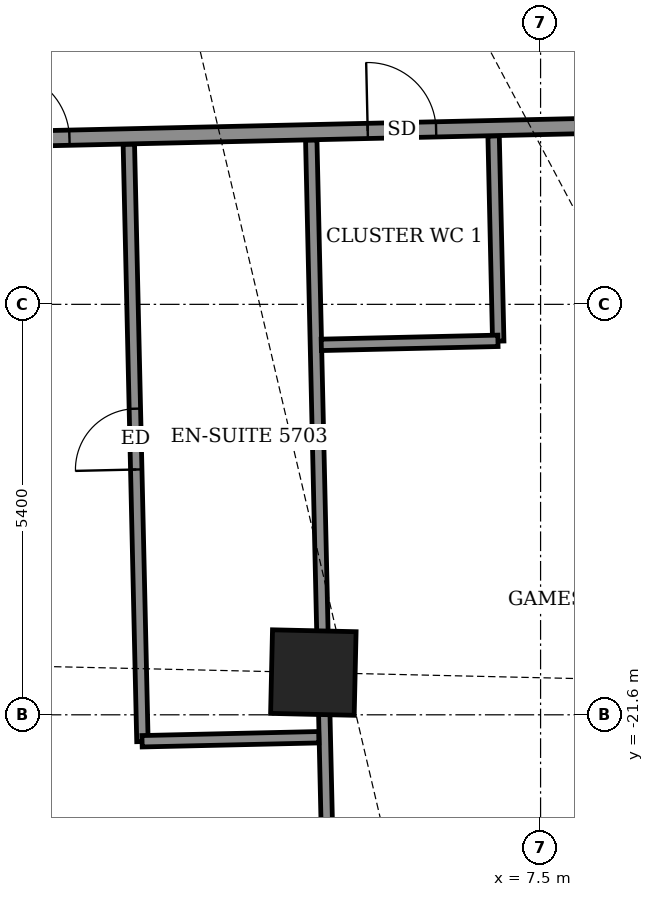
"""IFC4 building model, lengths in metres.
Left out: names, types, materials, properties, quantities, classifications, styles, units other than length and angle.
Written with IfcOpenShell. Run it as: python <this file> out.ifc"""

import sys

from ifc_helpers import new_model, si_unit, direction, frame, frame_2d, origin, origin_2d, place, context, subcontext, project, spatial, rectangle, extrude, element, fill, save


model = new_model("IFC4")
c1 = context("Model", 3, precision=1e-05, world=origin(), true_north=direction((0.0, 1.0)))
c2 = subcontext(c1, "Body", "Model", "MODEL_VIEW")
j1 = project(units=[si_unit("LENGTHUNIT", "METRE"), si_unit("PLANEANGLEUNIT", "RADIAN")], contexts=[c1])
p1 = place(None, origin())
s1 = spatial("IfcSite", under=j1, at=p1, CompositionType="ELEMENT")
p2 = place(p1, origin())
s2 = spatial("IfcBuilding", under=s1, at=p2, CompositionType="ELEMENT")
p3 = place(p2, frame((0.0, 0.0, 226.5)))
s3 = spatial("IfcBuildingStorey", under=s2, at=p3, CompositionType="ELEMENT", Elevation=226.5)
p4 = place(p3, frame((4.51, -21.044, -0.55), z_axis=(0.0, 0.0, 1.0), x_axis=(0.999742129581, -0.022708464065, 0.0)))
e1 = element("IfcColumn", 1, at=p4, inside=s3, PredefinedType="COLUMN", context=c2, shape_type="SweptSolid", body=[
    extrude(rectangle(XDim=1.1, YDim=1.1, at=origin_2d()), origin(), (0.0, 0.0, 1.0), 4.6),
])
p5 = place(p3, frame((4.741, -25.412, 0.0), z_axis=(0.0, 0.0, 1.0), x_axis=(-0.022684355347, 0.999742676904, 0.0)))
e2 = element("IfcWall", 2, at=p5, inside=s3, PredefinedType="PARTITIONING", context=c2, shape_type="SweptSolid", body=[
    extrude(rectangle(XDim=11.376, YDim=0.15, at=frame_2d((5.688, 0.0))), origin(), (0.0, 0.0, 1.0), 2.85),
])
p6 = place(p3, frame((2.262, -21.952, 0.0), z_axis=(0.0, 0.0, 1.0), x_axis=(-0.022767973308, 0.999740776097, 0.0)))
e3 = element("IfcWall", 3, at=p6, inside=s3, PredefinedType="PARTITIONING", context=c2, shape_type="SweptSolid", body=[
    extrude(rectangle(XDim=7.86, YDim=0.15, at=frame_2d((3.93, 0.0))), origin(), (0.0, 0.0, 1.0), 2.55),
])
p7 = place(p6, frame((3.58, 0.0, 0.0)))
e4 = element("IfcOpeningElement", 4, at=p7, cuts=e3, PredefinedType="OPENING", context=c2, shape_type="SweptSolid", body=[
    extrude(rectangle(XDim=0.8, YDim=2.1, at=frame_2d((0.4, 1.05))), frame((0.0, 0.085, 0.0), z_axis=(0.0, -1.0, 0.0), x_axis=(1.0, 0.0, 0.0)), (0.0, 0.0, 1.0), 0.17),
])
p8 = place(p3, frame((2.257, -21.948, 0.0), z_axis=(0.0, 0.0, 1.0), x_axis=(0.999740478815, 0.022781023197, 0.0)))
e5 = element("IfcWall", 5, at=p8, inside=s3, PredefinedType="PARTITIONING", context=c2, shape_type="SweptSolid", body=[
    extrude(rectangle(XDim=2.325, YDim=0.15, at=frame_2d((1.163, 0.0))), origin(), (0.0, 0.0, 1.0), 2.85),
])
p9 = place(p3, frame((6.943, -16.684, 0.0), z_axis=(0.0, 0.0, 1.0), x_axis=(-0.02260842146, 0.999744396973, 0.0)))
e6 = element("IfcWall", 6, at=p9, inside=s3, PredefinedType="PARTITIONING", context=c2, shape_type="SweptSolid", body=[
    extrude(rectangle(XDim=2.7, YDim=0.15, at=frame_2d((1.35, 0.0))), origin(), (0.0, 0.0, 1.0), 2.85),
])
p10 = place(p3, frame((4.615, -16.733, 0.0), z_axis=(0.0, 0.0, 1.0), x_axis=(0.999740260747, 0.02279059109, 0.0)))
e7 = element("IfcWall", 7, at=p10, inside=s3, PredefinedType="PARTITIONING", context=c2, shape_type="SweptSolid", body=[
    extrude(rectangle(XDim=2.324, YDim=0.15, at=frame_2d((1.162, 0.0))), origin(), (0.0, 0.0, 1.0), 2.85),
])
p11 = place(p3, frame((-27.016, -14.65, 0.0), z_axis=(0.0, 0.0, 1.0), x_axis=(0.999742722722, 0.022682335961, 0.0)))
e8 = element("IfcWall", 8, at=p11, inside=s3, PredefinedType="PARTITIONING", context=c2, shape_type="SweptSolid", body=[
    extrude(rectangle(XDim=49.114, YDim=0.2, at=frame_2d((24.557, 0.0))), origin(), (0.0, 0.0, 1.0), 2.55),
])
p12 = place(p11, frame((2.0, 0.0, 0.0)))
e9 = element("IfcOpeningElement", 9, at=p12, cuts=e8, PredefinedType="OPENING", context=c2, shape_type="SweptSolid", body=[
    extrude(rectangle(XDim=1.0, YDim=2.1, at=frame_2d((0.5, 1.05))), frame((0.0, 0.11, 0.0), z_axis=(0.0, -1.0, 0.0), x_axis=(1.0, 0.0, 0.0)), (0.0, 0.0, 1.0), 0.22),
])
p13 = place(p11, frame((7.35, 0.0, 0.0)))
e10 = element("IfcOpeningElement", 10, at=p13, cuts=e8, PredefinedType="OPENING", context=c2, shape_type="SweptSolid", body=[
    extrude(rectangle(XDim=0.9, YDim=2.1, at=frame_2d((0.45, 1.05))), frame((0.0, 0.11, 0.0), z_axis=(0.0, -1.0, 0.0), x_axis=(1.0, 0.0, 0.0)), (0.0, 0.0, 1.0), 0.22),
])
p14 = place(p11, frame((13.725, 0.0, 0.0)))
e11 = element("IfcOpeningElement", 11, at=p14, cuts=e8, PredefinedType="OPENING", context=c2, shape_type="SweptSolid", body=[
    extrude(rectangle(XDim=1.0, YDim=2.1, at=frame_2d((0.5, 1.05))), frame((0.0, 0.11, 0.0), z_axis=(0.0, -1.0, 0.0), x_axis=(1.0, 0.0, 0.0)), (0.0, 0.0, 1.0), 0.22),
])
p15 = place(p11, frame((9.85, 0.0, 0.0)))
e12 = element("IfcOpeningElement", 12, at=p15, cuts=e8, PredefinedType="OPENING", context=c2, shape_type="SweptSolid", body=[
    extrude(rectangle(XDim=0.9, YDim=2.1, at=frame_2d((0.45, 1.05))), frame((0.0, 0.11, 0.0), z_axis=(0.0, -1.0, 0.0), x_axis=(1.0, 0.0, 0.0)), (0.0, 0.0, 1.0), 0.22),
])
p16 = place(p11, frame((17.65, 0.0, 0.0)))
e13 = element("IfcOpeningElement", 13, at=p16, cuts=e8, PredefinedType="OPENING", context=c2, shape_type="SweptSolid", body=[
    extrude(rectangle(XDim=0.9, YDim=2.1, at=frame_2d((0.45, 1.05))), frame((0.0, 0.11, 0.0), z_axis=(0.0, -1.0, 0.0), x_axis=(1.0, 0.0, 0.0)), (0.0, 0.0, 1.0), 0.22),
])
p17 = place(p11, frame((24.95, 0.0, 0.0)))
e14 = element("IfcOpeningElement", 14, at=p17, cuts=e8, PredefinedType="OPENING", context=c2, shape_type="SweptSolid", body=[
    extrude(rectangle(XDim=0.9, YDim=2.1, at=frame_2d((0.45, 1.05))), frame((0.0, 0.11, 0.0), z_axis=(0.0, -1.0, 0.0), x_axis=(1.0, 0.0, 0.0)), (0.0, 0.0, 1.0), 0.22),
])
p18 = place(p11, frame((27.425, 0.0, 0.0)))
e15 = element("IfcOpeningElement", 15, at=p18, cuts=e8, PredefinedType="OPENING", context=c2, shape_type="SweptSolid", body=[
    extrude(rectangle(XDim=0.9, YDim=2.1, at=frame_2d((0.45, 1.05))), frame((0.0, 0.11, 0.0), z_axis=(0.0, -1.0, 0.0), x_axis=(1.0, 0.0, 0.0)), (0.0, 0.0, 1.0), 0.22),
])
p19 = place(p11, frame((35.75, 0.0, 0.0)))
e16 = element("IfcOpeningElement", 16, at=p19, cuts=e8, PredefinedType="OPENING", context=c2, shape_type="SweptSolid", body=[
    extrude(rectangle(XDim=1.0, YDim=2.1, at=frame_2d((0.5, 1.05))), frame((0.0, 0.11, 0.0), z_axis=(0.0, -1.0, 0.0), x_axis=(1.0, 0.0, 0.0)), (0.0, 0.0, 1.0), 0.22),
])
p20 = place(p11, frame((32.25, 0.0, 0.0)))
e17 = element("IfcOpeningElement", 17, at=p20, cuts=e8, PredefinedType="OPENING", context=c2, shape_type="SweptSolid", body=[
    extrude(rectangle(XDim=0.9, YDim=2.1, at=frame_2d((0.45, 1.05))), frame((0.0, 0.11, 0.0), z_axis=(0.0, -1.0, 0.0), x_axis=(1.0, 0.0, 0.0)), (0.0, 0.0, 1.0), 0.22),
])
p21 = place(p11, frame((40.925, 0.0, 0.0)))
e18 = element("IfcOpeningElement", 18, at=p21, cuts=e8, PredefinedType="OPENING", context=c2, shape_type="SweptSolid", body=[
    extrude(rectangle(XDim=1.0, YDim=2.1, at=frame_2d((0.5, 1.05))), frame((0.0, 0.11, 0.0), z_axis=(0.0, -1.0, 0.0), x_axis=(1.0, 0.0, 0.0)), (0.0, 0.0, 1.0), 0.22),
])
p22 = place(p11, frame((47.607, 0.0, 0.0)))
e19 = element("IfcOpeningElement", 19, at=p22, cuts=e8, PredefinedType="OPENING", context=c2, shape_type="SweptSolid", body=[
    extrude(rectangle(XDim=1.0, YDim=2.1, at=frame_2d((0.5, 1.05))), frame((0.0, 0.11, 0.0), z_axis=(0.0, -1.0, 0.0), x_axis=(1.0, 0.0, 0.0)), (0.0, 0.0, 1.0), 0.22),
])
p23 = place(p18, origin())
e20 = element("IfcDoor", 20, at=p23, inside=s3, OperationType="SINGLE_SWING_LEFT", PredefinedType="DOOR", context=c2, shape_type="SweptSolid", body=[
    extrude(rectangle(XDim=0.9, YDim=2.1, at=frame_2d((0.45, 1.05))), frame((0.0, 0.025, 0.0), z_axis=(0.0, -1.0, 0.0), x_axis=(1.0, 0.0, 0.0)), (0.0, 0.0, 1.0), 0.05),
])
fill(e15, e20)
p24 = place(p7, origin())
e21 = element("IfcDoor", 21, at=p24, inside=s3, OperationType="SINGLE_SWING_LEFT", PredefinedType="DOOR", context=c2, shape_type="SweptSolid", body=[
    extrude(rectangle(XDim=0.8, YDim=2.1, at=frame_2d((0.4, 1.05))), frame((0.0, 0.025, 0.0), z_axis=(0.0, -1.0, 0.0), x_axis=(1.0, 0.0, 0.0)), (0.0, 0.0, 1.0), 0.05),
])
fill(e4, e21)
p25 = place(p20, origin())
e22 = element("IfcDoor", 22, at=p25, inside=s3, OperationType="SINGLE_SWING_LEFT", PredefinedType="DOOR", context=c2, shape_type="SweptSolid", body=[
    extrude(rectangle(XDim=0.9, YDim=2.1, at=frame_2d((0.45, 1.05))), frame((0.0, 0.025, 0.0), z_axis=(0.0, -1.0, 0.0), x_axis=(1.0, 0.0, 0.0)), (0.0, 0.0, 1.0), 0.05),
])
fill(e17, e22)
save(model, sys.argv[1])
